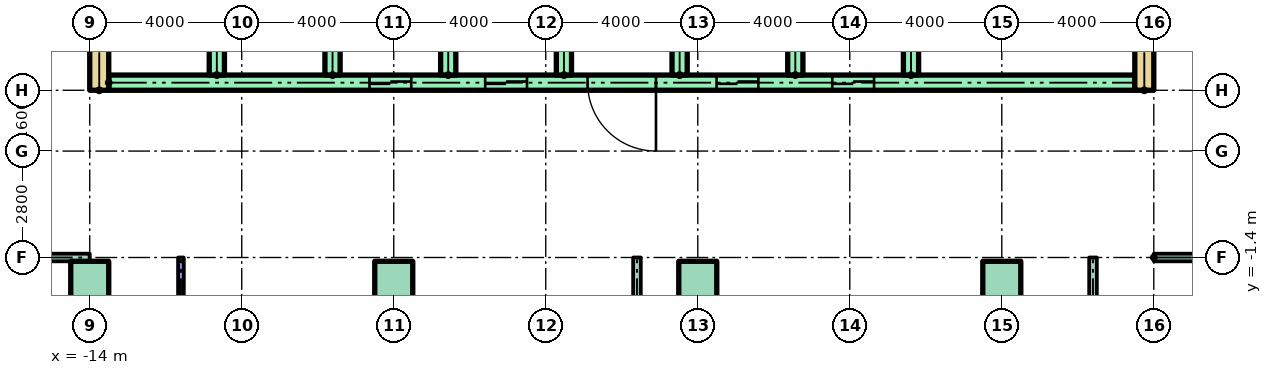
"""IFC4 building model, lengths in metres.
Left out: names, types, materials, properties, quantities, classifications, styles, units other than length and angle.
Written with IfcOpenShell. Run it as: python <this file> out.ifc"""

import sys

from ifc_helpers import new_model, si_unit, direction, frame, frame_2d, origin, origin_2d, place, context, subcontext, project, spatial, rectangle, extrude, element, fill, save


model = new_model("IFC4")
c1 = context("Model", 3, precision=1e-05, world=origin(), true_north=direction((0.0, 1.0)))
c2 = subcontext(c1, "Body", "Model", "MODEL_VIEW")
j1 = project(units=[si_unit("LENGTHUNIT", "METRE"), si_unit("PLANEANGLEUNIT", "RADIAN")], contexts=[c1])
p1 = place(None, origin())
s1 = spatial("IfcSite", under=j1, at=p1, CompositionType="ELEMENT")
p2 = place(p1, origin())
s2 = spatial("IfcBuilding", under=s1, at=p2, CompositionType="ELEMENT")
p3 = place(p2, frame((0.0, 0.0, 6.0)))
s3 = spatial("IfcBuildingStorey", under=s2, at=p3, CompositionType="ELEMENT", Elevation=6.0)
for number, where in (
    (1, (-14.0, -2.0, 0.0)),
    (2, (-6.0, -2.0, 0.0)),
    (3, (2.0, -2.0, 0.0)),
    (4, (10.0, -2.0, 0.0)),
):
    element("IfcColumn", number, at=place(p3, frame(where)), inside=s3, PredefinedType="COLUMN", context=c2, shape_type="SweptSolid", body=[
        extrude(rectangle(XDim=1.0, YDim=1.0, at=origin_2d()), origin(), (0.0, 0.0, 1.0), 4.0),
    ])
for number, where, z_axis, x_axis in (
    (5, (-13.75, 3.0, 0.0), (0.0, 0.0, 1.0), (0.0, 1.0, 0.0)),
    (6, (13.75, 3.0, 0.0), (0.0, 0.0, 1.0), (0.0, 1.0, 0.0)),
):
    element("IfcWall", number, at=place(p3, frame(where, z_axis=z_axis, x_axis=x_axis)), inside=s3, PredefinedType="SHEAR", context=c2, shape_type="SweptSolid", body=[
        extrude(rectangle(XDim=17.0, YDim=0.5, at=frame_2d((8.5, 0.0))), origin(), (0.0, 0.0, 1.0), 3.7),
    ])
p4 = place(p3, frame((-13.5, 3.2, 0.0)))
e7 = element("IfcWall", 7, at=p4, inside=s3, PredefinedType="SHEAR", context=c2, shape_type="SweptSolid", body=[
    extrude(rectangle(XDim=27.0, YDim=0.4, at=frame_2d((13.5, 0.0))), origin(), (0.0, 0.0, 1.0), 3.7),
])
p5 = place(p4, frame((6.861, 0.0, 0.0)))
e8 = element("IfcOpeningElement", 8, at=p5, cuts=e7, PredefinedType="OPENING", context=c2, shape_type="SweptSolid", body=[
    extrude(rectangle(XDim=1.1, YDim=2.1, at=frame_2d((0.55, 1.05))), frame((0.0, 0.21, 0.0), z_axis=(0.0, -1.0, 0.0), x_axis=(1.0, 0.0, 0.0)), (0.0, 0.0, 1.0), 0.42),
])
p6 = place(p4, frame((9.906, 0.0, 0.0)))
e9 = element("IfcOpeningElement", 9, at=p6, cuts=e7, PredefinedType="OPENING", context=c2, shape_type="SweptSolid", body=[
    extrude(rectangle(XDim=1.1, YDim=2.1, at=frame_2d((0.55, 1.05))), frame((0.0, 0.21, 0.0), z_axis=(0.0, -1.0, 0.0), x_axis=(1.0, 0.0, 0.0)), (0.0, 0.0, 1.0), 0.42),
])
p7 = place(p4, frame((15.994, 0.0, 0.0)))
e10 = element("IfcOpeningElement", 10, at=p7, cuts=e7, PredefinedType="OPENING", context=c2, shape_type="SweptSolid", body=[
    extrude(rectangle(XDim=1.1, YDim=2.1, at=frame_2d((0.55, 1.05))), frame((0.0, 0.21, 0.0), z_axis=(0.0, -1.0, 0.0), x_axis=(1.0, 0.0, 0.0)), (0.0, 0.0, 1.0), 0.42),
])
p8 = place(p4, frame((19.039, 0.0, 0.0)))
e11 = element("IfcOpeningElement", 11, at=p8, cuts=e7, PredefinedType="OPENING", context=c2, shape_type="SweptSolid", body=[
    extrude(rectangle(XDim=1.1, YDim=2.1, at=frame_2d((0.55, 1.05))), frame((0.0, 0.21, 0.0), z_axis=(0.0, -1.0, 0.0), x_axis=(1.0, 0.0, 0.0)), (0.0, 0.0, 1.0), 0.42),
])
p9 = place(p4, frame((12.6, 0.0, 0.0)))
e12 = element("IfcOpeningElement", 12, at=p9, cuts=e7, PredefinedType="OPENING", context=c2, shape_type="SweptSolid", body=[
    extrude(rectangle(XDim=1.8, YDim=2.1, at=frame_2d((0.9, 1.05))), frame((0.0, 0.21, 0.0), z_axis=(0.0, -1.0, 0.0), x_axis=(1.0, 0.0, 0.0)), (0.0, 0.0, 1.0), 0.42),
])
for number, where, z_axis, x_axis in (
    (13, (-10.656, 3.4, 0.0), (0.0, 0.0, 1.0), (0.0, 1.0, 0.0)),
    (14, (-7.611, 3.4, 0.0), (0.0, 0.0, 1.0), (0.0, 1.0, 0.0)),
    (15, (-4.567, 3.4, 0.0), (0.0, 0.0, 1.0), (0.0, 1.0, 0.0)),
    (16, (-1.522, 3.4, 0.0), (0.0, 0.0, 1.0), (0.0, 1.0, 0.0)),
    (17, (1.522, 3.4, 0.0), (0.0, 0.0, 1.0), (0.0, 1.0, 0.0)),
    (18, (4.567, 3.4, 0.0), (0.0, 0.0, 1.0), (0.0, 1.0, 0.0)),
    (19, (7.611, 3.4, 0.0), (0.0, 0.0, 1.0), (0.0, 1.0, 0.0)),
):
    element("IfcWall", number, at=place(p3, frame(where, z_axis=z_axis, x_axis=x_axis)), inside=s3, PredefinedType="SHEAR", context=c2, shape_type="SweptSolid", body=[
        extrude(rectangle(XDim=3.0, YDim=0.4, at=frame_2d((1.5, 0.0))), origin(), (0.0, 0.0, 1.0), 3.7),
    ])
for number, where in (
    (20, (-36.9, -1.4, 0.0)),
    (21, (14.0, -1.4, 0.0)),
):
    element("IfcWall", number, at=place(p3, frame(where)), inside=s3, PredefinedType="PARTITIONING", context=c2, shape_type="SweptSolid", body=[
        extrude(rectangle(XDim=22.9, YDim=0.2, at=frame_2d((11.45, 0.0))), origin(), (0.0, 0.0, 1.0), 3.7),
    ])
p10 = place(p3, frame((-11.6, -6.25, 0.0), z_axis=(0.0, 0.0, 1.0), x_axis=(0.0, 1.0, 0.0)))
e22 = element("IfcWall", 22, at=p10, inside=s3, PredefinedType="PARTITIONING", context=c2, shape_type="SweptSolid", body=[
    extrude(rectangle(XDim=4.85, YDim=0.15, at=frame_2d((2.425, 0.0))), origin(), (0.0, 0.0, 1.0), 3.7),
])
for number, where, z_axis, x_axis in (
    (23, (0.4, -6.25, 0.0), (0.0, 0.0, 1.0), (0.0, 1.0, 0.0)),
    (24, (12.4, -6.25, 0.0), (0.0, 0.0, 1.0), (0.0, 1.0, 0.0)),
):
    element("IfcWall", number, at=place(p3, frame(where, z_axis=z_axis, x_axis=x_axis)), inside=s3, PredefinedType="PARTITIONING", context=c2, shape_type="SweptSolid", body=[
        extrude(rectangle(XDim=4.85, YDim=0.2, at=frame_2d((2.425, 0.0))), origin(), (0.0, 0.0, 1.0), 3.7),
    ])
p11 = place(p5, origin())
e25 = element("IfcDoor", 25, at=p11, inside=s3, OperationType="SLIDING_TO_LEFT", PredefinedType="DOOR", context=c2, shape_type="SweptSolid", body=[
    extrude(rectangle(XDim=1.1, YDim=2.1, at=frame_2d((0.55, 1.05))), frame((0.0, 0.025, 0.0), z_axis=(0.0, -1.0, 0.0), x_axis=(1.0, 0.0, 0.0)), (0.0, 0.0, 1.0), 0.05),
])
fill(e8, e25)
p12 = place(p6, origin())
e26 = element("IfcDoor", 26, at=p12, inside=s3, OperationType="SLIDING_TO_LEFT", PredefinedType="DOOR", context=c2, shape_type="SweptSolid", body=[
    extrude(rectangle(XDim=1.1, YDim=2.1, at=frame_2d((0.55, 1.05))), frame((0.0, 0.025, 0.0), z_axis=(0.0, -1.0, 0.0), x_axis=(1.0, 0.0, 0.0)), (0.0, 0.0, 1.0), 0.05),
])
fill(e9, e26)
p13 = place(p7, origin())
e27 = element("IfcDoor", 27, at=p13, inside=s3, OperationType="SLIDING_TO_LEFT", PredefinedType="DOOR", context=c2, shape_type="SweptSolid", body=[
    extrude(rectangle(XDim=1.1, YDim=2.1, at=frame_2d((0.55, 1.05))), frame((0.0, 0.025, 0.0), z_axis=(0.0, -1.0, 0.0), x_axis=(1.0, 0.0, 0.0)), (0.0, 0.0, 1.0), 0.05),
])
fill(e10, e27)
p14 = place(p8, origin())
e28 = element("IfcDoor", 28, at=p14, inside=s3, OperationType="SLIDING_TO_LEFT", PredefinedType="DOOR", context=c2, shape_type="SweptSolid", body=[
    extrude(rectangle(XDim=1.1, YDim=2.1, at=frame_2d((0.55, 1.05))), frame((0.0, 0.025, 0.0), z_axis=(0.0, -1.0, 0.0), x_axis=(1.0, 0.0, 0.0)), (0.0, 0.0, 1.0), 0.05),
])
fill(e11, e28)
p15 = place(p9, frame((1.8, 0.0, 0.0), z_axis=(0.0, 0.0, 1.0), x_axis=(-1.0, 0.0, 0.0)))
e29 = element("IfcDoor", 29, at=p15, inside=s3, OperationType="DOUBLE_DOOR_SINGLE_SWING", PredefinedType="DOOR", context=c2, shape_type="SweptSolid", body=[
    extrude(rectangle(XDim=1.8, YDim=2.1, at=frame_2d((0.9, 1.05))), frame((0.0, 0.025, 0.0), z_axis=(0.0, -1.0, 0.0), x_axis=(1.0, 0.0, 0.0)), (0.0, 0.0, 1.0), 0.05),
])
fill(e12, e29)
save(model, sys.argv[1])
